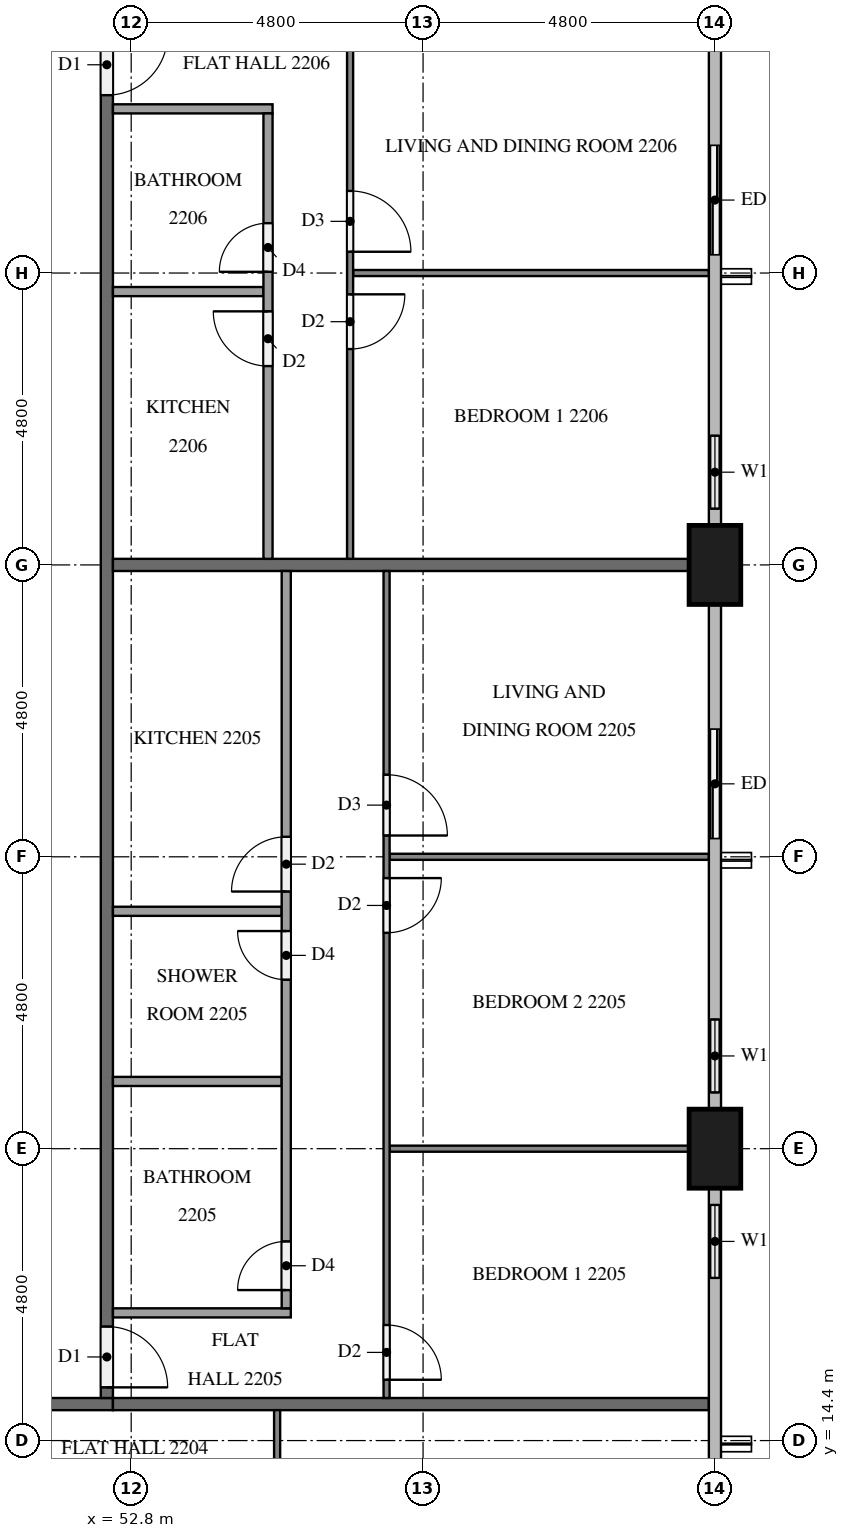
"""IFC4 building model, lengths in metres.
Left out: names, types, materials, properties, quantities, classifications, styles, units other than length and angle.
Written with IfcOpenShell. Run it as: python <this file> out.ifc"""

import sys

from ifc_helpers import new_model, si_unit, direction, frame, frame_2d, origin, origin_2d, place, context, subcontext, project, spatial, rectangle, extrude, element, fill, save


model = new_model("IFC4")
c1 = context("Model", 3, precision=1e-05, world=origin(), true_north=direction((0.0, 1.0)))
c2 = subcontext(c1, "Body", "Model", "MODEL_VIEW")
j1 = project(units=[si_unit("LENGTHUNIT", "METRE"), si_unit("PLANEANGLEUNIT", "RADIAN")], contexts=[c1])
p1 = place(None, origin())
s1 = spatial("IfcSite", under=j1, at=p1, CompositionType="ELEMENT")
p2 = place(p1, origin())
s2 = spatial("IfcBuilding", under=s1, at=p2, CompositionType="ELEMENT")
p3 = place(p2, frame((0.0, 0.0, 89.2)))
s3 = spatial("IfcBuildingStorey", under=s2, at=p3, CompositionType="ELEMENT", Elevation=89.2)
for number, where, z_axis, x_axis in (
    (1, (62.4, 19.2, 0.0), (0.0, 0.0, 1.0), (0.0, 1.0, 0.0)),
    (2, (62.4, 28.8, 0.0), (0.0, 0.0, 1.0), (0.0, 1.0, 0.0)),
):
    element("IfcColumn", number, at=place(p3, frame(where, z_axis=z_axis, x_axis=x_axis)), inside=s3, PredefinedType="COLUMN", context=c2, shape_type="SweptSolid", body=[
        extrude(rectangle(XDim=1.3, YDim=0.85, at=origin_2d()), origin(), (0.0, 0.0, 1.0), 3.2),
    ])
p4 = place(p3, frame((62.4, 16.8, 0.0), z_axis=(0.0, 0.0, 1.0), x_axis=(0.0, 1.0, 0.0)))
e3 = element("IfcWall", 3, at=p4, inside=s3, PredefinedType="SOLIDWALL", context=c2, shape_type="SweptSolid", body=[
    extrude(rectangle(XDim=1.75, YDim=0.15, at=frame_2d((0.875, 0.0))), origin(), (0.0, 0.0, 1.0), 3.2),
])
p5 = place(p4, frame((0.275, 0.0, 0.9)))
e4 = element("IfcOpeningElement", 4, at=p5, cuts=e3, PredefinedType="OPENING", context=c2, shape_type="SweptSolid", body=[
    extrude(rectangle(XDim=1.2, YDim=1.4, at=frame_2d((0.6, 0.7))), frame((0.0, 0.085, 0.0), z_axis=(0.0, -1.0, 0.0), x_axis=(1.0, 0.0, 0.0)), (0.0, 0.0, 1.0), 0.17),
])
p6 = place(p3, frame((62.4, 19.85, 0.0), z_axis=(0.0, 0.0, 1.0), x_axis=(0.0, 1.0, 0.0)))
e5 = element("IfcWall", 5, at=p6, inside=s3, PredefinedType="SOLIDWALL", context=c2, shape_type="SweptSolid", body=[
    extrude(rectangle(XDim=1.75, YDim=0.15, at=frame_2d((0.875, 0.0))), origin(), (0.0, 0.0, 1.0), 3.2),
])
p7 = place(p6, frame((0.275, 0.0, 0.9)))
e6 = element("IfcOpeningElement", 6, at=p7, cuts=e5, PredefinedType="OPENING", context=c2, shape_type="SweptSolid", body=[
    extrude(rectangle(XDim=1.2, YDim=1.4, at=frame_2d((0.6, 0.7))), frame((0.0, 0.085, 0.0), z_axis=(0.0, -1.0, 0.0), x_axis=(1.0, 0.0, 0.0)), (0.0, 0.0, 1.0), 0.17),
])
p8 = place(p3, frame((62.4, 24.0, 0.0), z_axis=(0.0, 0.0, 1.0), x_axis=(0.0, 1.0, 0.0)))
e7 = element("IfcWall", 7, at=p8, inside=s3, PredefinedType="SOLIDWALL", context=c2, shape_type="SweptSolid", body=[
    extrude(rectangle(XDim=2.4, YDim=0.15, at=frame_2d((1.2, 0.0))), origin(), (0.0, 0.0, 1.0), 3.2),
])
p9 = place(p8, frame((0.3, 0.0, 0.0)))
e8 = element("IfcOpeningElement", 8, at=p9, cuts=e7, PredefinedType="OPENING", context=c2, shape_type="SweptSolid", body=[
    extrude(rectangle(XDim=1.8, YDim=2.4, at=frame_2d((0.9, 1.2))), frame((0.0, 0.085, 0.0), z_axis=(0.0, -1.0, 0.0), x_axis=(1.0, 0.0, 0.0)), (0.0, 0.0, 1.0), 0.17),
])
p10 = place(p3, frame((62.4, 29.45, 0.0), z_axis=(0.0, 0.0, 1.0), x_axis=(0.0, 1.0, 0.0)))
e9 = element("IfcWall", 9, at=p10, inside=s3, PredefinedType="SOLIDWALL", context=c2, shape_type="SweptSolid", body=[
    extrude(rectangle(XDim=1.75, YDim=0.15, at=frame_2d((0.875, 0.0))), origin(), (0.0, 0.0, 1.0), 3.2),
])
p11 = place(p10, frame((0.275, 0.0, 0.9)))
e10 = element("IfcOpeningElement", 10, at=p11, cuts=e9, PredefinedType="OPENING", context=c2, shape_type="SweptSolid", body=[
    extrude(rectangle(XDim=1.2, YDim=1.4, at=frame_2d((0.6, 0.7))), frame((0.0, 0.085, 0.0), z_axis=(0.0, -1.0, 0.0), x_axis=(1.0, 0.0, 0.0)), (0.0, 0.0, 1.0), 0.17),
])
p12 = place(p3, frame((62.4, 33.6, 0.0), z_axis=(0.0, 0.0, 1.0), x_axis=(0.0, 1.0, 0.0)))
e11 = element("IfcWall", 11, at=p12, inside=s3, PredefinedType="SOLIDWALL", context=c2, shape_type="SweptSolid", body=[
    extrude(rectangle(XDim=2.4, YDim=0.15, at=frame_2d((1.2, 0.0))), origin(), (0.0, 0.0, 1.0), 3.2),
])
p13 = place(p12, frame((0.3, 0.0, 0.0)))
e12 = element("IfcOpeningElement", 12, at=p13, cuts=e11, PredefinedType="OPENING", context=c2, shape_type="SweptSolid", body=[
    extrude(rectangle(XDim=1.8, YDim=2.4, at=frame_2d((0.9, 1.2))), frame((0.0, 0.085, 0.0), z_axis=(0.0, -1.0, 0.0), x_axis=(1.0, 0.0, 0.0)), (0.0, 0.0, 1.0), 0.17),
])
p14 = place(p3, frame((50.3, 15.0, 0.0), z_axis=(0.0, 0.0, 1.0), x_axis=(1.0, 0.0, 0.0)))
e13 = element("IfcWall", 13, at=p14, inside=s3, PredefinedType="PARTITIONING", context=c2, shape_type="SweptSolid", body=[
    extrude(rectangle(XDim=2.2, YDim=0.2, at=frame_2d((1.1, 0.0))), origin(), (0.0, 0.0, 1.0), 3.2),
])
p15 = place(p3, frame((52.4, 37.7, 0.0), z_axis=(0.0, 0.0, 1.0), x_axis=(0.0, -1.0, 0.0)))
e14 = element("IfcWall", 14, at=p15, inside=s3, PredefinedType="PARTITIONING", context=c2, shape_type="SweptSolid", body=[
    extrude(rectangle(XDim=22.6, YDim=0.2, at=frame_2d((11.3, 0.0))), origin(), (0.0, 0.0, 1.0), 3.2),
])
p16 = place(p15, frame((21.425, 0.0, 0.0)))
e15 = element("IfcOpeningElement", 15, at=p16, cuts=e14, PredefinedType="OPENING", context=c2, shape_type="SweptSolid", body=[
    extrude(rectangle(XDim=1.0, YDim=2.1, at=frame_2d((0.5, 1.05))), frame((0.0, 0.11, 0.0), z_axis=(0.0, -1.0, 0.0), x_axis=(1.0, 0.0, 0.0)), (0.0, 0.0, 1.0), 0.22),
])
p17 = place(p15, frame((0.175, 0.0, 0.0)))
e16 = element("IfcOpeningElement", 16, at=p17, cuts=e14, PredefinedType="OPENING", context=c2, shape_type="SweptSolid", body=[
    extrude(rectangle(XDim=1.0, YDim=2.1, at=frame_2d((0.5, 1.05))), frame((0.0, 0.11, 0.0), z_axis=(0.0, -1.0, 0.0), x_axis=(1.0, 0.0, 0.0)), (0.0, 0.0, 1.0), 0.22),
])
p18 = place(p3, frame((52.5, 15.0, 0.0), z_axis=(0.0, 0.0, 1.0), x_axis=(1.0, 0.0, 0.0)))
e17 = element("IfcWall", 17, at=p18, inside=s3, PredefinedType="PARTITIONING", context=c2, shape_type="SweptSolid", body=[
    extrude(rectangle(XDim=9.8, YDim=0.2, at=frame_2d((4.9, 0.0))), origin(), (0.0, 0.0, 1.0), 3.2),
])
p19 = place(p3, frame((52.5, 28.8, 0.0), z_axis=(0.0, 0.0, 1.0), x_axis=(1.0, 0.0, 0.0)))
e18 = element("IfcWall", 18, at=p19, inside=s3, PredefinedType="PARTITIONING", context=c2, shape_type="SweptSolid", body=[
    extrude(rectangle(XDim=9.475, YDim=0.2, at=frame_2d((4.738, 0.0))), origin(), (0.0, 0.0, 1.0), 3.2),
])
p20 = place(p3, frame((55.2, 14.9, 0.0), z_axis=(0.0, 0.0, 1.0), x_axis=(0.0, -1.0, 0.0)))
e19 = element("IfcWall", 19, at=p20, inside=s3, PredefinedType="PARTITIONING", context=c2, shape_type="SweptSolid", body=[
    extrude(rectangle(XDim=10.0, YDim=0.1, at=frame_2d((5.0, 0.0))), origin(), (0.0, 0.0, 1.0), 3.2),
])
p21 = place(p20, frame((4.05, 0.0, 0.0)))
e20 = element("IfcOpeningElement", 20, at=p21, cuts=e19, PredefinedType="OPENING", context=c2, shape_type="SweptSolid", body=[
    extrude(rectangle(XDim=0.9, YDim=2.1, at=frame_2d((0.45, 1.05))), frame((0.0, 0.06, 0.0), z_axis=(0.0, -1.0, 0.0), x_axis=(1.0, 0.0, 0.0)), (0.0, 0.0, 1.0), 0.12),
])
p22 = place(p20, frame((5.65, 0.0, 0.0)))
e21 = element("IfcOpeningElement", 21, at=p22, cuts=e19, PredefinedType="OPENING", context=c2, shape_type="SweptSolid", body=[
    extrude(rectangle(XDim=1.0, YDim=2.1, at=frame_2d((0.5, 1.05))), frame((0.0, 0.06, 0.0), z_axis=(0.0, -1.0, 0.0), x_axis=(1.0, 0.0, 0.0)), (0.0, 0.0, 1.0), 0.12),
])
p23 = place(p3, frame((57.05, 19.2, 0.0), z_axis=(0.0, 0.0, 1.0), x_axis=(1.0, 0.0, 0.0)))
e22 = element("IfcWall", 22, at=p23, inside=s3, PredefinedType="PARTITIONING", context=c2, shape_type="SweptSolid", body=[
    extrude(rectangle(XDim=4.925, YDim=0.1, at=frame_2d((2.462, 0.0))), origin(), (0.0, 0.0, 1.0), 3.2),
])
p24 = place(p3, frame((57.05, 24.0, 0.0), z_axis=(0.0, 0.0, 1.0), x_axis=(1.0, 0.0, 0.0)))
e23 = element("IfcWall", 23, at=p24, inside=s3, PredefinedType="PARTITIONING", context=c2, shape_type="SweptSolid", body=[
    extrude(rectangle(XDim=5.25, YDim=0.1, at=frame_2d((2.625, 0.0))), origin(), (0.0, 0.0, 1.0), 3.2),
])
p25 = place(p3, frame((57.0, 28.7, 0.0), z_axis=(0.0, 0.0, 1.0), x_axis=(0.0, -1.0, 0.0)))
e24 = element("IfcWall", 24, at=p25, inside=s3, PredefinedType="PARTITIONING", context=c2, shape_type="SweptSolid", body=[
    extrude(rectangle(XDim=13.6, YDim=0.1, at=frame_2d((6.8, 0.0))), origin(), (0.0, 0.0, 1.0), 3.2),
])
p26 = place(p25, frame((12.4, 0.0, 0.0)))
e25 = element("IfcOpeningElement", 25, at=p26, cuts=e24, PredefinedType="OPENING", context=c2, shape_type="SweptSolid", body=[
    extrude(rectangle(XDim=0.9, YDim=2.1, at=frame_2d((0.45, 1.05))), frame((0.0, 0.06, 0.0), z_axis=(0.0, -1.0, 0.0), x_axis=(1.0, 0.0, 0.0)), (0.0, 0.0, 1.0), 0.12),
])
p27 = place(p25, frame((5.05, 0.0, 0.0)))
e26 = element("IfcOpeningElement", 26, at=p27, cuts=e24, PredefinedType="OPENING", context=c2, shape_type="SweptSolid", body=[
    extrude(rectangle(XDim=0.9, YDim=2.1, at=frame_2d((0.45, 1.05))), frame((0.0, 0.06, 0.0), z_axis=(0.0, -1.0, 0.0), x_axis=(1.0, 0.0, 0.0)), (0.0, 0.0, 1.0), 0.12),
])
p28 = place(p25, frame((3.35, 0.0, 0.0)))
e27 = element("IfcOpeningElement", 27, at=p28, cuts=e24, PredefinedType="OPENING", context=c2, shape_type="SweptSolid", body=[
    extrude(rectangle(XDim=1.0, YDim=2.1, at=frame_2d((0.5, 1.05))), frame((0.0, 0.06, 0.0), z_axis=(0.0, -1.0, 0.0), x_axis=(1.0, 0.0, 0.0)), (0.0, 0.0, 1.0), 0.12),
])
for number, where, z_axis, x_axis in (
    (28, (52.5, 20.306, 0.0), (0.0, 0.0, 1.0), (1.0, 0.0, 0.0)),
    (29, (52.5, 23.104, 0.0), (0.0, 0.0, 1.0), (1.0, 0.0, 0.0)),
):
    element("IfcWall", number, at=place(p3, frame(where, z_axis=z_axis, x_axis=x_axis)), inside=s3, PredefinedType="PARTITIONING", context=c2, shape_type="SweptSolid", body=[
        extrude(rectangle(XDim=2.775, YDim=0.15, at=frame_2d((1.387, 0.0))), origin(), (0.0, 0.0, 1.0), 3.2),
    ])
p29 = place(p3, frame((52.5, 16.5, 0.0), z_axis=(0.0, 0.0, 1.0), x_axis=(1.0, 0.0, 0.0)))
e30 = element("IfcWall", 30, at=p29, inside=s3, PredefinedType="PARTITIONING", context=c2, shape_type="SweptSolid", body=[
    extrude(rectangle(XDim=2.925, YDim=0.15, at=frame_2d((1.462, 0.0))), origin(), (0.0, 0.0, 1.0), 3.2),
])
p30 = place(p3, frame((55.35, 16.575, 0.0), z_axis=(0.0, 0.0, 1.0), x_axis=(0.0, 1.0, 0.0)))
e31 = element("IfcWall", 31, at=p30, inside=s3, PredefinedType="PARTITIONING", context=c2, shape_type="SweptSolid", body=[
    extrude(rectangle(XDim=12.125, YDim=0.15, at=frame_2d((6.062, 0.0))), origin(), (0.0, 0.0, 1.0), 3.2),
])
p31 = place(p30, frame((0.3, 0.0, 0.0)))
e32 = element("IfcOpeningElement", 32, at=p31, cuts=e31, PredefinedType="OPENING", context=c2, shape_type="SweptSolid", body=[
    extrude(rectangle(XDim=0.8, YDim=2.1, at=frame_2d((0.4, 1.05))), frame((0.0, 0.085, 0.0), z_axis=(0.0, -1.0, 0.0), x_axis=(1.0, 0.0, 0.0)), (0.0, 0.0, 1.0), 0.17),
])
p32 = place(p30, frame((5.404, 0.0, 0.0)))
e33 = element("IfcOpeningElement", 33, at=p32, cuts=e31, PredefinedType="OPENING", context=c2, shape_type="SweptSolid", body=[
    extrude(rectangle(XDim=0.8, YDim=2.1, at=frame_2d((0.4, 1.05))), frame((0.0, 0.085, 0.0), z_axis=(0.0, -1.0, 0.0), x_axis=(1.0, 0.0, 0.0)), (0.0, 0.0, 1.0), 0.17),
])
p33 = place(p30, frame((6.854, 0.0, 0.0)))
e34 = element("IfcOpeningElement", 34, at=p33, cuts=e31, PredefinedType="OPENING", context=c2, shape_type="SweptSolid", body=[
    extrude(rectangle(XDim=0.9, YDim=2.1, at=frame_2d((0.45, 1.05))), frame((0.0, 0.085, 0.0), z_axis=(0.0, -1.0, 0.0), x_axis=(1.0, 0.0, 0.0)), (0.0, 0.0, 1.0), 0.17),
])
p34 = place(p3, frame((56.45, 33.6, 0.0), z_axis=(0.0, 0.0, 1.0), x_axis=(1.0, 0.0, 0.0)))
e35 = element("IfcWall", 35, at=p34, inside=s3, PredefinedType="PARTITIONING", context=c2, shape_type="SweptSolid", body=[
    extrude(rectangle(XDim=5.85, YDim=0.1, at=frame_2d((2.925, 0.0))), origin(), (0.0, 0.0, 1.0), 3.2),
])
p35 = place(p3, frame((56.4, 37.7, 0.0), z_axis=(0.0, 0.0, 1.0), x_axis=(0.0, -1.0, 0.0)))
e36 = element("IfcWall", 36, at=p35, inside=s3, PredefinedType="PARTITIONING", context=c2, shape_type="SweptSolid", body=[
    extrude(rectangle(XDim=8.8, YDim=0.1, at=frame_2d((4.4, 0.0))), origin(), (0.0, 0.0, 1.0), 3.2),
])
p36 = place(p35, frame((2.75, 0.0, 0.0)))
e37 = element("IfcOpeningElement", 37, at=p36, cuts=e36, PredefinedType="OPENING", context=c2, shape_type="SweptSolid", body=[
    extrude(rectangle(XDim=1.0, YDim=2.1, at=frame_2d((0.5, 1.05))), frame((0.0, 0.06, 0.0), z_axis=(0.0, -1.0, 0.0), x_axis=(1.0, 0.0, 0.0)), (0.0, 0.0, 1.0), 0.12),
])
p37 = place(p35, frame((4.45, 0.0, 0.0)))
e38 = element("IfcOpeningElement", 38, at=p37, cuts=e36, PredefinedType="OPENING", context=c2, shape_type="SweptSolid", body=[
    extrude(rectangle(XDim=0.9, YDim=2.1, at=frame_2d((0.45, 1.05))), frame((0.0, 0.06, 0.0), z_axis=(0.0, -1.0, 0.0), x_axis=(1.0, 0.0, 0.0)), (0.0, 0.0, 1.0), 0.12),
])
p38 = place(p3, frame((52.5, 33.295, 0.0), z_axis=(0.0, 0.0, 1.0), x_axis=(1.0, 0.0, 0.0)))
e39 = element("IfcWall", 39, at=p38, inside=s3, PredefinedType="PARTITIONING", context=c2, shape_type="SweptSolid", body=[
    extrude(rectangle(XDim=2.475, YDim=0.15, at=frame_2d((1.238, 0.0))), origin(), (0.0, 0.0, 1.0), 3.2),
])
p39 = place(p3, frame((52.5, 36.3, 0.0), z_axis=(0.0, 0.0, 1.0), x_axis=(1.0, 0.0, 0.0)))
e40 = element("IfcWall", 40, at=p39, inside=s3, PredefinedType="PARTITIONING", context=c2, shape_type="SweptSolid", body=[
    extrude(rectangle(XDim=2.625, YDim=0.15, at=frame_2d((1.312, 0.0))), origin(), (0.0, 0.0, 1.0), 3.2),
])
p40 = place(p3, frame((55.05, 28.9, 0.0), z_axis=(0.0, 0.0, 1.0), x_axis=(0.0, 1.0, 0.0)))
e41 = element("IfcWall", 41, at=p40, inside=s3, PredefinedType="PARTITIONING", context=c2, shape_type="SweptSolid", body=[
    extrude(rectangle(XDim=7.325, YDim=0.15, at=frame_2d((3.663, 0.0))), origin(), (0.0, 0.0, 1.0), 3.2),
])
p41 = place(p40, frame((4.72, 0.0, 0.0)))
e42 = element("IfcOpeningElement", 42, at=p41, cuts=e41, PredefinedType="OPENING", context=c2, shape_type="SweptSolid", body=[
    extrude(rectangle(XDim=0.8, YDim=2.1, at=frame_2d((0.4, 1.05))), frame((0.0, 0.085, 0.0), z_axis=(0.0, -1.0, 0.0), x_axis=(1.0, 0.0, 0.0)), (0.0, 0.0, 1.0), 0.17),
])
p42 = place(p40, frame((3.17, 0.0, 0.0)))
e43 = element("IfcOpeningElement", 43, at=p42, cuts=e41, PredefinedType="OPENING", context=c2, shape_type="SweptSolid", body=[
    extrude(rectangle(XDim=0.9, YDim=2.1, at=frame_2d((0.45, 1.05))), frame((0.0, 0.085, 0.0), z_axis=(0.0, -1.0, 0.0), x_axis=(1.0, 0.0, 0.0)), (0.0, 0.0, 1.0), 0.17),
])
p43 = place(p5, origin())
e44 = element("IfcWindow", 44, at=p43, inside=s3, PartitioningType="SINGLE_PANEL", PredefinedType="WINDOW", context=c2, shape_type="SweptSolid", body=[
    extrude(rectangle(XDim=1.2, YDim=1.4, at=frame_2d((0.6, 0.7))), frame((0.0, 0.03, 0.0), z_axis=(0.0, -1.0, 0.0), x_axis=(1.0, 0.0, 0.0)), (0.0, 0.0, 1.0), 0.06),
])
fill(e4, e44)
p44 = place(p7, origin())
e45 = element("IfcWindow", 45, at=p44, inside=s3, PartitioningType="SINGLE_PANEL", PredefinedType="WINDOW", context=c2, shape_type="SweptSolid", body=[
    extrude(rectangle(XDim=1.2, YDim=1.4, at=frame_2d((0.6, 0.7))), frame((0.0, 0.03, 0.0), z_axis=(0.0, -1.0, 0.0), x_axis=(1.0, 0.0, 0.0)), (0.0, 0.0, 1.0), 0.06),
])
fill(e6, e45)
p45 = place(p9, origin())
e46 = element("IfcDoor", 46, at=p45, inside=s3, OperationType="SLIDING_TO_RIGHT", PredefinedType="DOOR", context=c2, shape_type="SweptSolid", body=[
    extrude(rectangle(XDim=1.8, YDim=2.4, at=frame_2d((0.9, 1.2))), frame((0.0, 0.025, 0.0), z_axis=(0.0, -1.0, 0.0), x_axis=(1.0, 0.0, 0.0)), (0.0, 0.0, 1.0), 0.05),
])
fill(e8, e46)
p46 = place(p11, origin())
e47 = element("IfcWindow", 47, at=p46, inside=s3, PartitioningType="SINGLE_PANEL", PredefinedType="WINDOW", context=c2, shape_type="SweptSolid", body=[
    extrude(rectangle(XDim=1.2, YDim=1.4, at=frame_2d((0.6, 0.7))), frame((0.0, 0.03, 0.0), z_axis=(0.0, -1.0, 0.0), x_axis=(1.0, 0.0, 0.0)), (0.0, 0.0, 1.0), 0.06),
])
fill(e10, e47)
p47 = place(p13, origin())
e48 = element("IfcDoor", 48, at=p47, inside=s3, OperationType="SLIDING_TO_LEFT", PredefinedType="DOOR", context=c2, shape_type="SweptSolid", body=[
    extrude(rectangle(XDim=1.8, YDim=2.4, at=frame_2d((0.9, 1.2))), frame((0.0, 0.025, 0.0), z_axis=(0.0, -1.0, 0.0), x_axis=(1.0, 0.0, 0.0)), (0.0, 0.0, 1.0), 0.05),
])
fill(e12, e48)
p48 = place(p16, origin())
e49 = element("IfcDoor", 49, at=p48, inside=s3, OperationType="SINGLE_SWING_RIGHT", PredefinedType="DOOR", context=c2, shape_type="SweptSolid", body=[
    extrude(rectangle(XDim=1.0, YDim=2.1, at=frame_2d((0.5, 1.05))), frame((0.0, 0.025, 0.0), z_axis=(0.0, -1.0, 0.0), x_axis=(1.0, 0.0, 0.0)), (0.0, 0.0, 1.0), 0.05),
])
fill(e15, e49)
p49 = place(p17, origin())
e50 = element("IfcDoor", 50, at=p49, inside=s3, OperationType="SINGLE_SWING_LEFT", PredefinedType="DOOR", context=c2, shape_type="SweptSolid", body=[
    extrude(rectangle(XDim=1.0, YDim=2.1, at=frame_2d((0.5, 1.05))), frame((0.0, 0.025, 0.0), z_axis=(0.0, -1.0, 0.0), x_axis=(1.0, 0.0, 0.0)), (0.0, 0.0, 1.0), 0.05),
])
fill(e16, e50)
p50 = place(p26, origin())
e51 = element("IfcDoor", 51, at=p50, inside=s3, OperationType="SINGLE_SWING_RIGHT", PredefinedType="DOOR", context=c2, shape_type="SweptSolid", body=[
    extrude(rectangle(XDim=0.9, YDim=2.1, at=frame_2d((0.45, 1.05))), frame((0.0, 0.025, 0.0), z_axis=(0.0, -1.0, 0.0), x_axis=(1.0, 0.0, 0.0)), (0.0, 0.0, 1.0), 0.05),
])
fill(e25, e51)
p51 = place(p27, origin())
e52 = element("IfcDoor", 52, at=p51, inside=s3, OperationType="SINGLE_SWING_LEFT", PredefinedType="DOOR", context=c2, shape_type="SweptSolid", body=[
    extrude(rectangle(XDim=0.9, YDim=2.1, at=frame_2d((0.45, 1.05))), frame((0.0, 0.025, 0.0), z_axis=(0.0, -1.0, 0.0), x_axis=(1.0, 0.0, 0.0)), (0.0, 0.0, 1.0), 0.05),
])
fill(e26, e52)
p52 = place(p28, origin())
e53 = element("IfcDoor", 53, at=p52, inside=s3, OperationType="SINGLE_SWING_RIGHT", PredefinedType="DOOR", context=c2, shape_type="SweptSolid", body=[
    extrude(rectangle(XDim=1.0, YDim=2.1, at=frame_2d((0.5, 1.05))), frame((0.0, 0.025, 0.0), z_axis=(0.0, -1.0, 0.0), x_axis=(1.0, 0.0, 0.0)), (0.0, 0.0, 1.0), 0.05),
])
fill(e27, e53)
p53 = place(p31, origin())
e54 = element("IfcDoor", 54, at=p53, inside=s3, OperationType="SINGLE_SWING_LEFT", PredefinedType="DOOR", context=c2, shape_type="SweptSolid", body=[
    extrude(rectangle(XDim=0.8, YDim=2.1, at=frame_2d((0.4, 1.05))), frame((0.0, 0.025, 0.0), z_axis=(0.0, -1.0, 0.0), x_axis=(1.0, 0.0, 0.0)), (0.0, 0.0, 1.0), 0.05),
])
fill(e32, e54)
p54 = place(p32, origin())
e55 = element("IfcDoor", 55, at=p54, inside=s3, OperationType="SINGLE_SWING_RIGHT", PredefinedType="DOOR", context=c2, shape_type="SweptSolid", body=[
    extrude(rectangle(XDim=0.8, YDim=2.1, at=frame_2d((0.4, 1.05))), frame((0.0, 0.025, 0.0), z_axis=(0.0, -1.0, 0.0), x_axis=(1.0, 0.0, 0.0)), (0.0, 0.0, 1.0), 0.05),
])
fill(e33, e55)
p55 = place(p33, origin())
e56 = element("IfcDoor", 56, at=p55, inside=s3, OperationType="SINGLE_SWING_LEFT", PredefinedType="DOOR", context=c2, shape_type="SweptSolid", body=[
    extrude(rectangle(XDim=0.9, YDim=2.1, at=frame_2d((0.45, 1.05))), frame((0.0, 0.025, 0.0), z_axis=(0.0, -1.0, 0.0), x_axis=(1.0, 0.0, 0.0)), (0.0, 0.0, 1.0), 0.05),
])
fill(e34, e56)
p56 = place(p36, origin())
e57 = element("IfcDoor", 57, at=p56, inside=s3, OperationType="SINGLE_SWING_RIGHT", PredefinedType="DOOR", context=c2, shape_type="SweptSolid", body=[
    extrude(rectangle(XDim=1.0, YDim=2.1, at=frame_2d((0.5, 1.05))), frame((0.0, 0.025, 0.0), z_axis=(0.0, -1.0, 0.0), x_axis=(1.0, 0.0, 0.0)), (0.0, 0.0, 1.0), 0.05),
])
fill(e37, e57)
p57 = place(p37, origin())
e58 = element("IfcDoor", 58, at=p57, inside=s3, OperationType="SINGLE_SWING_LEFT", PredefinedType="DOOR", context=c2, shape_type="SweptSolid", body=[
    extrude(rectangle(XDim=0.9, YDim=2.1, at=frame_2d((0.45, 1.05))), frame((0.0, 0.025, 0.0), z_axis=(0.0, -1.0, 0.0), x_axis=(1.0, 0.0, 0.0)), (0.0, 0.0, 1.0), 0.05),
])
fill(e38, e58)
p58 = place(p41, origin())
e59 = element("IfcDoor", 59, at=p58, inside=s3, OperationType="SINGLE_SWING_LEFT", PredefinedType="DOOR", context=c2, shape_type="SweptSolid", body=[
    extrude(rectangle(XDim=0.8, YDim=2.1, at=frame_2d((0.4, 1.05))), frame((0.0, 0.025, 0.0), z_axis=(0.0, -1.0, 0.0), x_axis=(1.0, 0.0, 0.0)), (0.0, 0.0, 1.0), 0.05),
])
fill(e42, e59)
p59 = place(p42, origin())
e60 = element("IfcDoor", 60, at=p59, inside=s3, OperationType="SINGLE_SWING_RIGHT", PredefinedType="DOOR", context=c2, shape_type="SweptSolid", body=[
    extrude(rectangle(XDim=0.9, YDim=2.1, at=frame_2d((0.45, 1.05))), frame((0.0, 0.025, 0.0), z_axis=(0.0, -1.0, 0.0), x_axis=(1.0, 0.0, 0.0)), (0.0, 0.0, 1.0), 0.05),
])
fill(e43, e60)
save(model, sys.argv[1])
